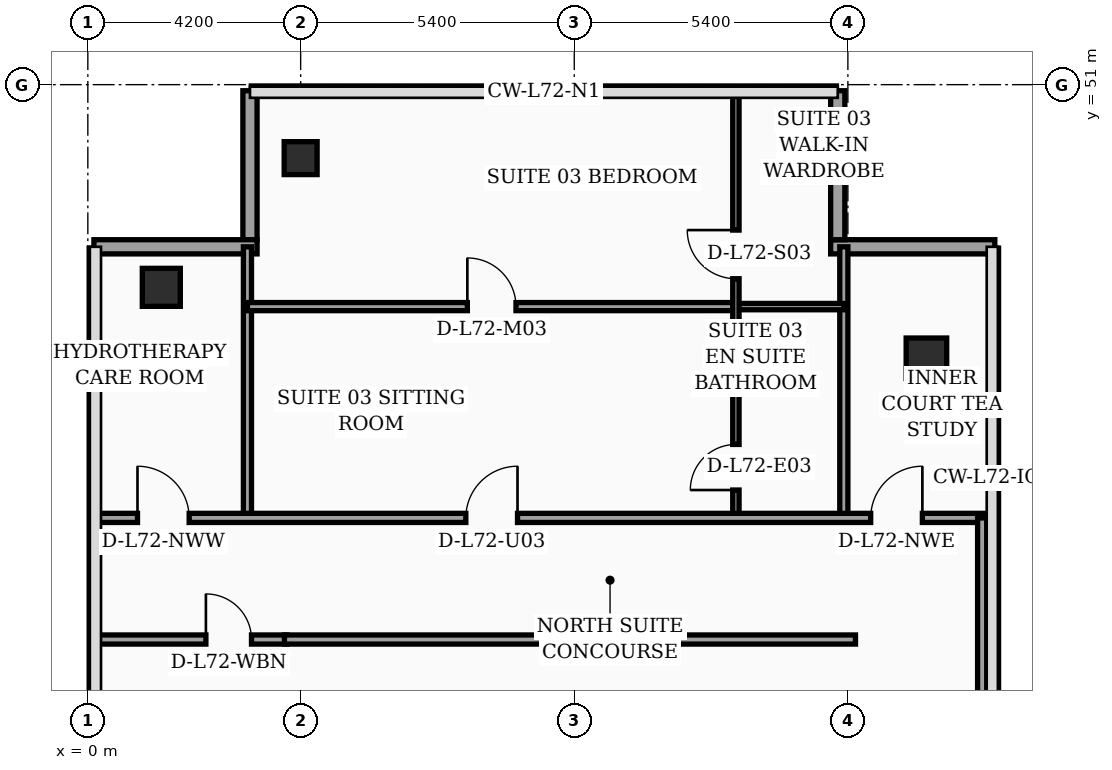
"""IFC4 building model, lengths in metres.
Left out: names, types, materials, properties, quantities, classifications, styles, units other than length and angle.
Written with IfcOpenShell. Run it as: python <this file> out.ifc"""

import sys

from ifc_helpers import new_model, si_unit, direction, frame, frame_2d, origin, origin_2d, place, context, subcontext, project, spatial, rectangle, hollow_rectangle, extrude, element, fill, save


model = new_model("IFC4")
c1 = context("Model", 3, precision=1e-05, world=origin(), true_north=direction((0.0, 1.0)))
c2 = subcontext(c1, "Body", "Model", "MODEL_VIEW")
j1 = project(units=[si_unit("LENGTHUNIT", "METRE"), si_unit("PLANEANGLEUNIT", "RADIAN")], contexts=[c1])
p1 = place(None, origin())
s1 = spatial("IfcSite", under=j1, at=p1, CompositionType="ELEMENT")
p2 = place(p1, origin())
s2 = spatial("IfcBuilding", under=s1, at=p2, CompositionType="ELEMENT")
p3 = place(p2, frame((0.0, 0.0, 291.1)))
s3 = spatial("IfcBuildingStorey", under=s2, at=p3, CompositionType="ELEMENT", Elevation=291.1)
p4 = place(p3, frame((1.45, 47.0, 0.0), z_axis=(0.0, 0.0, 1.0), x_axis=(1.0, 0.0, 0.0)))
e1 = element("IfcColumn", 1, at=p4, inside=s3, PredefinedType="COLUMN", context=c2, shape_type="SweptSolid", body=[
    extrude(hollow_rectangle(XDim=0.75, YDim=0.75, WallThickness=0.032, at=origin_2d()), origin(), (0.0, 0.0, 1.0), 3.56),
])
p5 = place(p3, frame((4.2, 49.55, 0.0), z_axis=(0.0, 0.0, 1.0), x_axis=(1.0, 0.0, 0.0)))
e2 = element("IfcColumn", 2, at=p5, inside=s3, PredefinedType="COLUMN", context=c2, shape_type="SweptSolid", body=[
    extrude(hollow_rectangle(XDim=0.65, YDim=0.65, WallThickness=0.028, at=origin_2d()), origin(), (0.0, 0.0, 1.0), 3.56),
])
p6 = place(p3, frame((16.55, 45.6, 0.0), z_axis=(0.0, 0.0, 1.0), x_axis=(1.0, 0.0, 0.0)))
e3 = element("IfcColumn", 3, at=p6, inside=s3, PredefinedType="COLUMN", context=c2, shape_type="SweptSolid", body=[
    extrude(rectangle(XDim=0.8, YDim=0.8, at=origin_2d()), origin(), (0.0, 0.0, 1.0), 3.56),
])
p7 = place(p3, frame((17.9, 47.8, 0.0), z_axis=(0.0, 0.0, 1.0), x_axis=(-1.0, 0.0, 0.0)))
e4 = element("IfcWall", 4, at=p7, inside=s3, PredefinedType="SOLIDWALL", context=c2, shape_type="SweptSolid", body=[
    extrude(rectangle(XDim=3.24, YDim=0.28, at=frame_2d((1.62, 0.0))), origin(), (0.0, 0.0, 1.0), 3.56),
])
p8 = place(p3, frame((14.8, 47.94, 0.0), z_axis=(0.0, 0.0, 1.0), x_axis=(0.0, 1.0, 0.0)))
e5 = element("IfcWall", 5, at=p8, inside=s3, PredefinedType="SOLIDWALL", context=c2, shape_type="SweptSolid", body=[
    extrude(rectangle(XDim=2.94, YDim=0.28, at=frame_2d((1.47, 0.0))), origin(), (0.0, 0.0, 1.0), 3.56),
])
p9 = place(p3, frame((3.2, 50.88, 0.0), z_axis=(0.0, 0.0, 1.0), x_axis=(0.0, -1.0, 0.0)))
e6 = element("IfcWall", 6, at=p9, inside=s3, PredefinedType="SOLIDWALL", context=c2, shape_type="SweptSolid", body=[
    extrude(rectangle(XDim=2.94, YDim=0.28, at=frame_2d((1.47, 0.0))), origin(), (0.0, 0.0, 1.0), 3.09),
])
p10 = place(p3, frame((3.34, 47.8, 0.0), z_axis=(0.0, 0.0, 1.0), x_axis=(-1.0, 0.0, 0.0)))
e7 = element("IfcWall", 7, at=p10, inside=s3, PredefinedType="SOLIDWALL", context=c2, shape_type="SweptSolid", body=[
    extrude(rectangle(XDim=3.22, YDim=0.28, at=frame_2d((1.61, 0.0))), origin(), (0.0, 0.0, 1.0), 3.09),
])
p11 = place(p3, frame((0.08, 40.05, 0.0), z_axis=(0.0, 0.0, 1.0), x_axis=(1.0, 0.0, 0.0)))
e8 = element("IfcWall", 8, at=p11, inside=s3, PredefinedType="PARTITIONING", context=c2, shape_type="SweptSolid", body=[
    extrude(rectangle(XDim=3.85, YDim=0.18, at=frame_2d((1.925, 0.0))), origin(), (0.0, 0.0, 1.0), 2.99),
])
p12 = place(p11, frame((2.25, 0.0, 0.0)))
e9 = element("IfcOpeningElement", 9, at=p12, cuts=e8, PredefinedType="OPENING", context=c2, shape_type="SweptSolid", body=[
    extrude(rectangle(XDim=0.9, YDim=2.15, at=frame_2d((0.45, 1.075))), frame((0.0, 0.1, 0.0), z_axis=(0.0, -1.0, 0.0), x_axis=(1.0, 0.0, 0.0)), (0.0, 0.0, 1.0), 0.2),
])
p13 = place(p3, frame((3.15, 42.45, 0.0), z_axis=(0.0, 0.0, 1.0), x_axis=(0.0, 1.0, 0.0)))
e10 = element("IfcWall", 10, at=p13, inside=s3, PredefinedType="PARTITIONING", context=c2, shape_type="SweptSolid", body=[
    extrude(rectangle(XDim=5.35, YDim=0.16, at=frame_2d((2.675, 0.0))), origin(), (0.0, 0.0, 1.0), 3.14),
])
p14 = place(p3, frame((14.92, 42.45, 0.0), z_axis=(0.0, 0.0, 1.0), x_axis=(0.0, 1.0, 0.0)))
e11 = element("IfcWall", 11, at=p14, inside=s3, PredefinedType="PARTITIONING", context=c2, shape_type="SweptSolid", body=[
    extrude(rectangle(XDim=5.35, YDim=0.16, at=frame_2d((2.675, 0.0))), origin(), (0.0, 0.0, 1.0), 3.09),
])
p15 = place(p3, frame((12.79, 46.62, 0.0), z_axis=(0.0, 0.0, 1.0), x_axis=(1.0, 0.0, 0.0)))
e12 = element("IfcWall", 12, at=p15, inside=s3, PredefinedType="PARTITIONING", context=c2, shape_type="SweptSolid", body=[
    extrude(rectangle(XDim=2.13, YDim=0.125, at=frame_2d((1.065, 0.0))), origin(), (0.0, 0.0, 1.0), 3.09),
])
p16 = place(p3, frame((3.15, 46.62, 0.0), z_axis=(0.0, 0.0, 1.0), x_axis=(1.0, 0.0, 0.0)))
e13 = element("IfcWall", 13, at=p16, inside=s3, PredefinedType="PARTITIONING", context=c2, shape_type="SweptSolid", body=[
    extrude(rectangle(XDim=9.64, YDim=0.16, at=frame_2d((4.82, 0.0))), origin(), (0.0, 0.0, 1.0), 2.99),
])
p17 = place(p16, frame((4.34, 0.0, 0.0)))
e14 = element("IfcOpeningElement", 14, at=p17, cuts=e13, PredefinedType="OPENING", context=c2, shape_type="SweptSolid", body=[
    extrude(rectangle(XDim=0.96, YDim=2.2, at=frame_2d((0.48, 1.1))), frame((0.0, 0.09, 0.0), z_axis=(0.0, -1.0, 0.0), x_axis=(1.0, 0.0, 0.0)), (0.0, 0.0, 1.0), 0.18),
])
p18 = place(p3, frame((12.79, 42.45, 0.0), z_axis=(0.0, 0.0, 1.0), x_axis=(0.0, 1.0, 0.0)))
e15 = element("IfcWall", 15, at=p18, inside=s3, PredefinedType="PARTITIONING", context=c2, shape_type="SweptSolid", body=[
    extrude(rectangle(XDim=8.49, YDim=0.125, at=frame_2d((4.245, 0.0))), origin(), (0.0, 0.0, 1.0), 3.09),
])
p19 = place(p18, frame((0.55, 0.0, 0.0)))
e16 = element("IfcOpeningElement", 16, at=p19, cuts=e15, PredefinedType="OPENING", context=c2, shape_type="SweptSolid", body=[
    extrude(rectangle(XDim=0.9, YDim=2.15, at=frame_2d((0.45, 1.075))), frame((0.0, 0.073, 0.0), z_axis=(0.0, -1.0, 0.0), x_axis=(1.0, 0.0, 0.0)), (0.0, 0.0, 1.0), 0.145),
])
p20 = place(p18, frame((4.72, 0.0, 0.0)))
e17 = element("IfcOpeningElement", 17, at=p20, cuts=e15, PredefinedType="OPENING", context=c2, shape_type="SweptSolid", body=[
    extrude(rectangle(XDim=0.96, YDim=2.2, at=frame_2d((0.48, 1.1))), frame((0.0, 0.073, 0.0), z_axis=(0.0, -1.0, 0.0), x_axis=(1.0, 0.0, 0.0)), (0.0, 0.0, 1.0), 0.145),
])
p21 = place(p3, frame((0.08, 42.45, 0.0), z_axis=(0.0, 0.0, 1.0), x_axis=(1.0, 0.0, 0.0)))
e18 = element("IfcWall", 18, at=p21, inside=s3, PredefinedType="PARTITIONING", context=c2, shape_type="SweptSolid", body=[
    extrude(rectangle(XDim=17.77, YDim=0.18, at=frame_2d((8.885, 0.0))), origin(), (0.0, 0.0, 1.0), 2.99),
])
p22 = place(p21, frame((0.9, 0.0, 0.0)))
e19 = element("IfcOpeningElement", 19, at=p22, cuts=e18, PredefinedType="OPENING", context=c2, shape_type="SweptSolid", body=[
    extrude(rectangle(XDim=1.02, YDim=2.2, at=frame_2d((0.51, 1.1))), frame((0.0, 0.1, 0.0), z_axis=(0.0, -1.0, 0.0), x_axis=(1.0, 0.0, 0.0)), (0.0, 0.0, 1.0), 0.2),
])
p23 = place(p21, frame((7.38, 0.0, 0.0)))
e20 = element("IfcOpeningElement", 20, at=p23, cuts=e18, PredefinedType="OPENING", context=c2, shape_type="SweptSolid", body=[
    extrude(rectangle(XDim=1.02, YDim=2.2, at=frame_2d((0.51, 1.1))), frame((0.0, 0.1, 0.0), z_axis=(0.0, -1.0, 0.0), x_axis=(1.0, 0.0, 0.0)), (0.0, 0.0, 1.0), 0.2),
])
p24 = place(p21, frame((15.37, 0.0, 0.0)))
e21 = element("IfcOpeningElement", 21, at=p24, cuts=e18, PredefinedType="OPENING", context=c2, shape_type="SweptSolid", body=[
    extrude(rectangle(XDim=1.02, YDim=2.2, at=frame_2d((0.51, 1.1))), frame((0.0, 0.1, 0.0), z_axis=(0.0, -1.0, 0.0), x_axis=(1.0, 0.0, 0.0)), (0.0, 0.0, 1.0), 0.2),
])
p25 = place(p3, frame((17.65, 24.3, 0.0), z_axis=(0.0, 0.0, 1.0), x_axis=(0.0, 1.0, 0.0)))
e22 = element("IfcWall", 22, at=p25, inside=s3, PredefinedType="PARTITIONING", context=c2, shape_type="SweptSolid", body=[
    extrude(rectangle(XDim=18.15, YDim=0.18, at=frame_2d((9.075, 0.0))), origin(), (0.0, 0.0, 1.0), 2.99),
])
p26 = place(p25, frame((3.2, 0.0, 0.0)))
e23 = element("IfcOpeningElement", 23, at=p26, cuts=e22, PredefinedType="OPENING", context=c2, shape_type="SweptSolid", body=[
    extrude(rectangle(XDim=1.02, YDim=2.2, at=frame_2d((0.51, 1.1))), frame((0.0, 0.1, 0.0), z_axis=(0.0, -1.0, 0.0), x_axis=(1.0, 0.0, 0.0)), (0.0, 0.0, 1.0), 0.2),
])
p27 = place(p3, frame((3.88, 40.05, 0.0), z_axis=(0.0, 0.0, 1.0), x_axis=(1.0, 0.0, 0.0)))
e24 = element("IfcWall", 24, at=p27, inside=s3, PredefinedType="PARTITIONING", context=c2, shape_type="SweptSolid", body=[
    extrude(rectangle(XDim=11.27, YDim=0.18, at=frame_2d((5.635, 0.0))), origin(), (0.0, 0.0, 1.0), 2.99),
])
p28 = place(p12, origin())
e25 = element("IfcDoor", 25, at=p28, inside=s3, OperationType="SINGLE_SWING_LEFT", PredefinedType="DOOR", context=c2, shape_type="SweptSolid", body=[
    extrude(rectangle(XDim=0.9, YDim=2.15, at=frame_2d((0.45, 1.075))), frame((0.0, 0.025, 0.0), z_axis=(0.0, -1.0, 0.0), x_axis=(1.0, 0.0, 0.0)), (0.0, 0.0, 1.0), 0.05),
])
fill(e9, e25)
p29 = place(p17, origin())
e26 = element("IfcDoor", 26, at=p29, inside=s3, OperationType="SINGLE_SWING_LEFT", PredefinedType="DOOR", context=c2, shape_type="SweptSolid", body=[
    extrude(rectangle(XDim=0.96, YDim=2.2, at=frame_2d((0.48, 1.1))), frame((0.0, 0.025, 0.0), z_axis=(0.0, -1.0, 0.0), x_axis=(1.0, 0.0, 0.0)), (0.0, 0.0, 1.0), 0.05),
])
fill(e14, e26)
p30 = place(p19, origin())
e27 = element("IfcDoor", 27, at=p30, inside=s3, OperationType="SINGLE_SWING_LEFT", PredefinedType="DOOR", context=c2, shape_type="SweptSolid", body=[
    extrude(rectangle(XDim=0.9, YDim=2.15, at=frame_2d((0.45, 1.075))), frame((0.0, 0.025, 0.0), z_axis=(0.0, -1.0, 0.0), x_axis=(1.0, 0.0, 0.0)), (0.0, 0.0, 1.0), 0.05),
])
fill(e16, e27)
p31 = place(p20, origin())
e28 = element("IfcDoor", 28, at=p31, inside=s3, OperationType="SINGLE_SWING_RIGHT", PredefinedType="DOOR", context=c2, shape_type="SweptSolid", body=[
    extrude(rectangle(XDim=0.96, YDim=2.2, at=frame_2d((0.48, 1.1))), frame((0.0, 0.025, 0.0), z_axis=(0.0, -1.0, 0.0), x_axis=(1.0, 0.0, 0.0)), (0.0, 0.0, 1.0), 0.05),
])
fill(e17, e28)
p32 = place(p22, origin())
e29 = element("IfcDoor", 29, at=p32, inside=s3, OperationType="SINGLE_SWING_LEFT", PredefinedType="DOOR", context=c2, shape_type="SweptSolid", body=[
    extrude(rectangle(XDim=1.02, YDim=2.2, at=frame_2d((0.51, 1.1))), frame((0.0, 0.025, 0.0), z_axis=(0.0, -1.0, 0.0), x_axis=(1.0, 0.0, 0.0)), (0.0, 0.0, 1.0), 0.05),
])
fill(e19, e29)
p33 = place(p23, origin())
e30 = element("IfcDoor", 30, at=p33, inside=s3, OperationType="SINGLE_SWING_RIGHT", PredefinedType="DOOR", context=c2, shape_type="SweptSolid", body=[
    extrude(rectangle(XDim=1.02, YDim=2.2, at=frame_2d((0.51, 1.1))), frame((0.0, 0.025, 0.0), z_axis=(0.0, -1.0, 0.0), x_axis=(1.0, 0.0, 0.0)), (0.0, 0.0, 1.0), 0.05),
])
fill(e20, e30)
p34 = place(p24, origin())
e31 = element("IfcDoor", 31, at=p34, inside=s3, OperationType="SINGLE_SWING_RIGHT", PredefinedType="DOOR", context=c2, shape_type="SweptSolid", body=[
    extrude(rectangle(XDim=1.02, YDim=2.2, at=frame_2d((0.51, 1.1))), frame((0.0, 0.025, 0.0), z_axis=(0.0, -1.0, 0.0), x_axis=(1.0, 0.0, 0.0)), (0.0, 0.0, 1.0), 0.05),
])
fill(e21, e31)
save(model, sys.argv[1])
